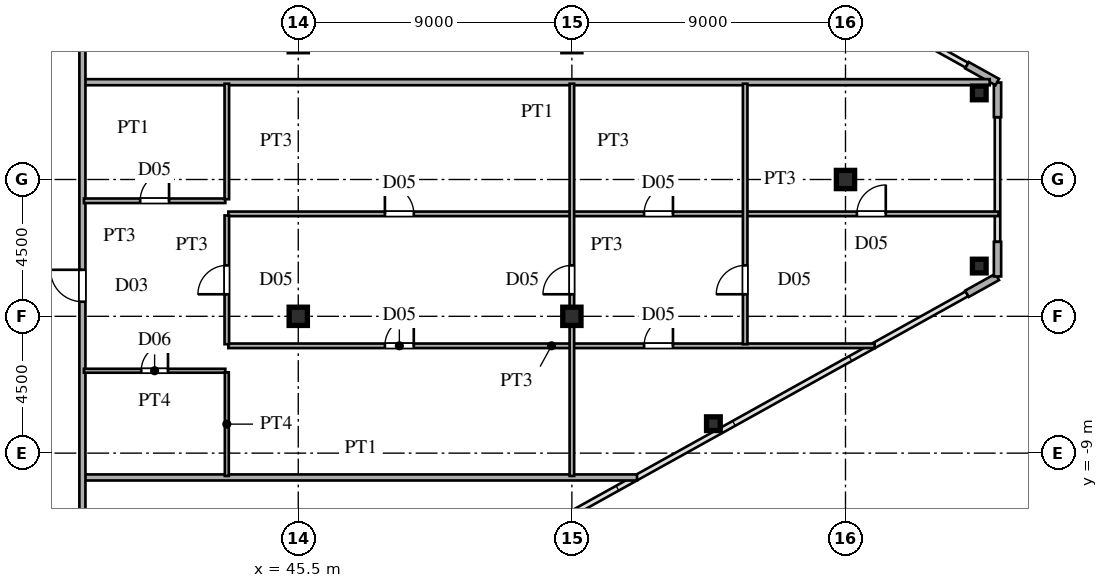
"""IFC4 building model, lengths in metres.
Left out: names, types, materials, properties, quantities, classifications, styles, units other than length and angle.
Written with IfcOpenShell. Run it as: python <this file> out.ifc"""

import sys

from ifc_helpers import new_model, si_unit, direction, frame, frame_2d, origin, origin_2d, place, context, subcontext, project, spatial, rectangle, hollow_rectangle, i_section, extrude, source, transform, mapped, element, fill, save


model = new_model("IFC4")
c1 = context("Model", 3, precision=1e-05, world=origin(), true_north=direction((0.0, 1.0)))
c2 = subcontext(c1, "Body", "Model", "MODEL_VIEW")
j1 = project(units=[si_unit("LENGTHUNIT", "METRE"), si_unit("PLANEANGLEUNIT", "RADIAN")], contexts=[c1])
p1 = place(None, origin())
s1 = spatial("IfcSite", under=j1, at=p1, CompositionType="ELEMENT")
p2 = place(p1, origin())
s2 = spatial("IfcBuilding", under=s1, at=p2, CompositionType="ELEMENT")
p3 = place(p2, frame((0.0, 0.0, 188.7)))
s3 = spatial("IfcBuildingStorey", under=s2, at=p3, CompositionType="ELEMENT", Elevation=188.7)
m1 = source(origin(), c2, "Body", "SweptSolid", [
    extrude(i_section(OverallWidth=0.6, OverallDepth=0.6, WebThickness=0.025, FlangeThickness=0.04, at=origin_2d()), origin(), (0.0, 0.0, 1.0), 3.6),
])
for number, where, z_axis, x_axis in (
    (1, (45.5, -4.5, 0.0), (0.0, 0.0, 1.0), (1.0, 0.0, 0.0)),
    (2, (54.5, -4.5, 0.0), (0.0, 0.0, 1.0), (1.0, 0.0, 0.0)),
    (3, (63.5, 0.0, 0.0), (0.0, 0.0, 1.0), (1.0, 0.0, 0.0)),
):
    element("IfcColumn", number, at=place(p3, frame(where, z_axis=z_axis, x_axis=x_axis)), inside=s3, PredefinedType="COLUMN", context=c2, shape_type="MappedRepresentation", body=[
        mapped(m1, transform((0.0, 0.0, 0.0), scale=1.0)),
    ])
m2 = source(origin(), c2, "Body", "SweptSolid", [
    extrude(hollow_rectangle(XDim=0.45, YDim=0.45, WallThickness=0.018, at=origin_2d()), origin(), (0.0, 0.0, 1.0), 3.6),
])
for number, where, z_axis, x_axis in (
    (4, (67.9, -2.847, 0.0), (0.0, 0.0, 1.0), (1.0, 0.0, 0.0)),
    (5, (67.9, 2.847, 0.0), (0.0, 0.0, 1.0), (1.0, 0.0, 0.0)),
    (6, (59.155, -8.031, 0.0), (0.0, 0.0, 1.0), (1.0, 0.0, 0.0)),
):
    element("IfcColumn", number, at=place(p3, frame(where, z_axis=z_axis, x_axis=x_axis)), inside=s3, PredefinedType="COLUMN", context=c2, shape_type="MappedRepresentation", body=[
        mapped(m2, transform((0.0, 0.0, 0.0), scale=1.0)),
    ])
for number, where, z_axis, x_axis in (
    (7, (67.495, -3.759, 0.0), (0.0, 0.0, 1.0), (0.874, 0.486, 0.0)),
    (8, (68.5, -3.19, 0.0), (0.0, 0.0, 1.0), (0.0, 1.0, 0.0)),
    (9, (68.5, 2.05, 0.0), (0.0, 0.0, 1.0), (0.0, 1.0, 0.0)),
    (10, (68.491, 3.205, 0.0), (0.0, 0.0, 1.0), (-0.874, 0.486, 0.0)),
):
    element("IfcWall", number, at=place(p3, frame(where, z_axis=z_axis, x_axis=x_axis)), inside=s3, PredefinedType="SOLIDWALL", context=c2, shape_type="SweptSolid", body=[
        extrude(rectangle(XDim=1.14, YDim=0.24, at=frame_2d((0.57, 0.0))), origin(), (0.0, 0.0, 1.0), 3.38),
    ])
p4 = place(p3, frame((38.48, -9.8, 0.0), z_axis=(0.0, 0.0, 1.0), x_axis=(1.0, 0.0, 0.0)))
e11 = element("IfcWall", 11, at=p4, inside=s3, PredefinedType="PARTITIONING", context=c2, shape_type="SweptSolid", body=[
    extrude(rectangle(XDim=18.163, YDim=0.2, at=frame_2d((9.082, 0.0))), origin(), (0.0, 0.0, 1.0), 3.38),
])
p5 = place(p3, frame((38.45, -6.29, 0.0), z_axis=(0.0, 0.0, 1.0), x_axis=(1.0, 0.0, 0.0)))
e12 = element("IfcWall", 12, at=p5, inside=s3, PredefinedType="PARTITIONING", context=c2, shape_type="SweptSolid", body=[
    extrude(rectangle(XDim=4.65, YDim=0.13, at=frame_2d((2.325, 0.0))), origin(), (0.0, 0.0, 1.0), 3.38),
])
p6 = place(p5, frame((1.885, 0.0, 0.0)))
e13 = element("IfcOpeningElement", 13, at=p6, cuts=e12, PredefinedType="OPENING", context=c2, shape_type="SweptSolid", body=[
    extrude(rectangle(XDim=0.88, YDim=2.1, at=frame_2d((0.44, 1.05))), frame((0.0, 0.075, 0.0), z_axis=(0.0, -1.0, 0.0), x_axis=(1.0, 0.0, 0.0)), (0.0, 0.0, 1.0), 0.15),
])
p7 = place(p3, frame((43.2, -5.47, 0.0), z_axis=(0.0, 0.0, 1.0), x_axis=(1.0, 0.0, 0.0)))
e14 = element("IfcWall", 14, at=p7, inside=s3, PredefinedType="PARTITIONING", context=c2, shape_type="SweptSolid", body=[
    extrude(rectangle(XDim=21.259, YDim=0.15, at=frame_2d((10.629, 0.0))), origin(), (0.0, 0.0, 1.0), 3.38),
])
p8 = place(p7, frame((5.15, 0.0, 0.0)))
e15 = element("IfcOpeningElement", 15, at=p8, cuts=e14, PredefinedType="OPENING", context=c2, shape_type="SweptSolid", body=[
    extrude(rectangle(XDim=0.95, YDim=2.15, at=frame_2d((0.475, 1.075))), frame((0.0, 0.085, 0.0), z_axis=(0.0, -1.0, 0.0), x_axis=(1.0, 0.0, 0.0)), (0.0, 0.0, 1.0), 0.17),
])
p9 = place(p7, frame((13.675, 0.0, 0.0)))
e16 = element("IfcOpeningElement", 16, at=p9, cuts=e14, PredefinedType="OPENING", context=c2, shape_type="SweptSolid", body=[
    extrude(rectangle(XDim=0.95, YDim=2.15, at=frame_2d((0.475, 1.075))), frame((0.0, 0.085, 0.0), z_axis=(0.0, -1.0, 0.0), x_axis=(1.0, 0.0, 0.0)), (0.0, 0.0, 1.0), 0.17),
])
p10 = place(p3, frame((43.2, -1.13, 0.0), z_axis=(0.0, 0.0, 1.0), x_axis=(1.0, 0.0, 0.0)))
e17 = element("IfcWall", 17, at=p10, inside=s3, PredefinedType="PARTITIONING", context=c2, shape_type="SweptSolid", body=[
    extrude(rectangle(XDim=25.335, YDim=0.15, at=frame_2d((12.667, 0.0))), origin(), (0.0, 0.0, 1.0), 3.38),
])
p11 = place(p10, frame((5.15, 0.0, 0.0)))
e18 = element("IfcOpeningElement", 18, at=p11, cuts=e17, PredefinedType="OPENING", context=c2, shape_type="SweptSolid", body=[
    extrude(rectangle(XDim=0.95, YDim=2.15, at=frame_2d((0.475, 1.075))), frame((0.0, 0.085, 0.0), z_axis=(0.0, -1.0, 0.0), x_axis=(1.0, 0.0, 0.0)), (0.0, 0.0, 1.0), 0.17),
])
p12 = place(p10, frame((20.675, 0.0, 0.0)))
e19 = element("IfcOpeningElement", 19, at=p12, cuts=e17, PredefinedType="OPENING", context=c2, shape_type="SweptSolid", body=[
    extrude(rectangle(XDim=0.95, YDim=2.15, at=frame_2d((0.475, 1.075))), frame((0.0, 0.085, 0.0), z_axis=(0.0, -1.0, 0.0), x_axis=(1.0, 0.0, 0.0)), (0.0, 0.0, 1.0), 0.17),
])
p13 = place(p10, frame((13.675, 0.0, 0.0)))
e20 = element("IfcOpeningElement", 20, at=p13, cuts=e17, PredefinedType="OPENING", context=c2, shape_type="SweptSolid", body=[
    extrude(rectangle(XDim=0.95, YDim=2.15, at=frame_2d((0.475, 1.075))), frame((0.0, 0.085, 0.0), z_axis=(0.0, -1.0, 0.0), x_axis=(1.0, 0.0, 0.0)), (0.0, 0.0, 1.0), 0.17),
])
p14 = place(p3, frame((38.45, -0.7, 0.0), z_axis=(0.0, 0.0, 1.0), x_axis=(1.0, 0.0, 0.0)))
e21 = element("IfcWall", 21, at=p14, inside=s3, PredefinedType="PARTITIONING", context=c2, shape_type="SweptSolid", body=[
    extrude(rectangle(XDim=4.65, YDim=0.15, at=frame_2d((2.325, 0.0))), origin(), (0.0, 0.0, 1.0), 3.38),
])
p15 = place(p14, frame((1.85, 0.0, 0.0)))
e22 = element("IfcOpeningElement", 22, at=p15, cuts=e21, PredefinedType="OPENING", context=c2, shape_type="SweptSolid", body=[
    extrude(rectangle(XDim=0.95, YDim=2.15, at=frame_2d((0.475, 1.075))), frame((0.0, 0.085, 0.0), z_axis=(0.0, -1.0, 0.0), x_axis=(1.0, 0.0, 0.0)), (0.0, 0.0, 1.0), 0.17),
])
p16 = place(p3, frame((38.48, 3.2, 0.0), z_axis=(0.0, 0.0, 1.0), x_axis=(1.0, 0.0, 0.0)))
e23 = element("IfcWall", 23, at=p16, inside=s3, PredefinedType="PARTITIONING", context=c2, shape_type="SweptSolid", body=[
    extrude(rectangle(XDim=29.763, YDim=0.2, at=frame_2d((14.881, 0.0))), origin(), (0.0, 0.0, 1.0), 3.38),
])
p17 = place(p3, frame((38.4, -15.715, 0.0), z_axis=(0.0, 0.0, 1.0), x_axis=(0.0, 1.0, 0.0)))
e24 = element("IfcWall", 24, at=p17, inside=s3, PredefinedType="PARTITIONING", context=c2, shape_type="SweptSolid", body=[
    extrude(rectangle(XDim=31.43, YDim=0.2, at=frame_2d((15.715, 0.0))), origin(), (0.0, 0.0, 1.0), 3.38),
])
p18 = place(p17, frame((2.39, 0.0, 0.0)))
e25 = element("IfcOpeningElement", 25, at=p18, cuts=e24, PredefinedType="OPENING", context=c2, shape_type="SweptSolid", body=[
    extrude(rectangle(XDim=1.05, YDim=2.25, at=frame_2d((0.525, 1.125))), frame((0.0, 0.11, 0.0), z_axis=(0.0, -1.0, 0.0), x_axis=(1.0, 0.0, 0.0)), (0.0, 0.0, 1.0), 0.22),
])
p19 = place(p17, frame((11.695, 0.0, 0.0)))
e26 = element("IfcOpeningElement", 26, at=p19, cuts=e24, PredefinedType="OPENING", context=c2, shape_type="SweptSolid", body=[
    extrude(rectangle(XDim=1.05, YDim=2.25, at=frame_2d((0.525, 1.125))), frame((0.0, 0.11, 0.0), z_axis=(0.0, -1.0, 0.0), x_axis=(1.0, 0.0, 0.0)), (0.0, 0.0, 1.0), 0.22),
])
p20 = place(p17, frame((24.69, 0.0, 0.0)))
e27 = element("IfcOpeningElement", 27, at=p20, cuts=e24, PredefinedType="OPENING", context=c2, shape_type="SweptSolid", body=[
    extrude(rectangle(XDim=1.05, YDim=2.25, at=frame_2d((0.525, 1.125))), frame((0.0, 0.11, 0.0), z_axis=(0.0, -1.0, 0.0), x_axis=(1.0, 0.0, 0.0)), (0.0, 0.0, 1.0), 0.22),
])
p21 = place(p3, frame((43.15, -9.75, 0.0), z_axis=(0.0, 0.0, 1.0), x_axis=(0.0, 1.0, 0.0)))
e28 = element("IfcWall", 28, at=p21, inside=s3, PredefinedType="PARTITIONING", context=c2, shape_type="SweptSolid", body=[
    extrude(rectangle(XDim=3.408, YDim=0.13, at=frame_2d((1.704, 0.0))), origin(), (0.0, 0.0, 1.0), 3.38),
])
p22 = place(p3, frame((43.15, -5.417, 0.0), z_axis=(0.0, 0.0, 1.0), x_axis=(0.0, 1.0, 0.0)))
e29 = element("IfcWall", 29, at=p22, inside=s3, PredefinedType="PARTITIONING", context=c2, shape_type="SweptSolid", body=[
    extrude(rectangle(XDim=4.234, YDim=0.15, at=frame_2d((2.117, 0.0))), origin(), (0.0, 0.0, 1.0), 2.99),
])
p23 = place(p22, frame((1.642, 0.0, 0.0)))
e30 = element("IfcOpeningElement", 30, at=p23, cuts=e29, PredefinedType="OPENING", context=c2, shape_type="SweptSolid", body=[
    extrude(rectangle(XDim=0.95, YDim=2.15, at=frame_2d((0.475, 1.075))), frame((0.0, 0.085, 0.0), z_axis=(0.0, -1.0, 0.0), x_axis=(1.0, 0.0, 0.0)), (0.0, 0.0, 1.0), 0.17),
])
p24 = place(p3, frame((43.15, -0.648, 0.0), z_axis=(0.0, 0.0, 1.0), x_axis=(0.0, 1.0, 0.0)))
e31 = element("IfcWall", 31, at=p24, inside=s3, PredefinedType="PARTITIONING", context=c2, shape_type="SweptSolid", body=[
    extrude(rectangle(XDim=3.798, YDim=0.15, at=frame_2d((1.899, 0.0))), origin(), (0.0, 0.0, 1.0), 3.38),
])
p25 = place(p3, frame((54.5, -9.75, 0.0), z_axis=(0.0, 0.0, 1.0), x_axis=(0.0, 1.0, 0.0)))
e32 = element("IfcWall", 32, at=p25, inside=s3, PredefinedType="PARTITIONING", context=c2, shape_type="SweptSolid", body=[
    extrude(rectangle(XDim=12.9, YDim=0.15, at=frame_2d((6.45, 0.0))), origin(), (0.0, 0.0, 1.0), 2.78),
])
p26 = place(p25, frame((5.975, 0.0, 0.0)))
e33 = element("IfcOpeningElement", 33, at=p26, cuts=e32, PredefinedType="OPENING", context=c2, shape_type="SweptSolid", body=[
    extrude(rectangle(XDim=0.95, YDim=2.15, at=frame_2d((0.475, 1.075))), frame((0.0, 0.085, 0.0), z_axis=(0.0, -1.0, 0.0), x_axis=(1.0, 0.0, 0.0)), (0.0, 0.0, 1.0), 0.17),
])
p27 = place(p3, frame((60.2, -5.417, 0.0), z_axis=(0.0, 0.0, 1.0), x_axis=(0.0, 1.0, 0.0)))
e34 = element("IfcWall", 34, at=p27, inside=s3, PredefinedType="PARTITIONING", context=c2, shape_type="SweptSolid", body=[
    extrude(rectangle(XDim=8.567, YDim=0.15, at=frame_2d((4.283, 0.0))), origin(), (0.0, 0.0, 1.0), 3.38),
])
p28 = place(p27, frame((1.642, 0.0, 0.0)))
e35 = element("IfcOpeningElement", 35, at=p28, cuts=e34, PredefinedType="OPENING", context=c2, shape_type="SweptSolid", body=[
    extrude(rectangle(XDim=0.95, YDim=2.15, at=frame_2d((0.475, 1.075))), frame((0.0, 0.085, 0.0), z_axis=(0.0, -1.0, 0.0), x_axis=(1.0, 0.0, 0.0)), (0.0, 0.0, 1.0), 0.17),
])
m3 = source(origin(), c2, "Body", "SweptSolid", [
    extrude(rectangle(XDim=0.88, YDim=2.1, at=frame_2d((0.44, 1.05))), frame((0.0, 0.025, 0.0), z_axis=(0.0, -1.0, 0.0), x_axis=(1.0, 0.0, 0.0)), (0.0, 0.0, 1.0), 0.05),
])
p29 = place(p6, origin())
e36 = element("IfcDoor", 36, at=p29, inside=s3, OperationType="SINGLE_SWING_RIGHT", PredefinedType="DOOR", context=c2, shape_type="MappedRepresentation", body=[
    mapped(m3, transform((0.0, 0.0, 0.0), scale=1.0)),
])
fill(e13, e36)
m4 = source(origin(), c2, "Body", "SweptSolid", [
    extrude(rectangle(XDim=0.95, YDim=2.15, at=frame_2d((0.475, 1.075))), frame((0.0, 0.025, 0.0), z_axis=(0.0, -1.0, 0.0), x_axis=(1.0, 0.0, 0.0)), (0.0, 0.0, 1.0), 0.05),
])
p30 = place(p8, origin())
e37 = element("IfcDoor", 37, at=p30, inside=s3, OperationType="SINGLE_SWING_RIGHT", PredefinedType="DOOR", context=c2, shape_type="MappedRepresentation", body=[
    mapped(m4, transform((0.0, 0.0, 0.0), scale=1.0)),
])
fill(e15, e37)
p31 = place(p9, origin())
e38 = element("IfcDoor", 38, at=p31, inside=s3, OperationType="SINGLE_SWING_RIGHT", PredefinedType="DOOR", context=c2, shape_type="MappedRepresentation", body=[
    mapped(m4, transform((0.0, 0.0, 0.0), scale=1.0)),
])
fill(e16, e38)
p32 = place(p11, origin())
e39 = element("IfcDoor", 39, at=p32, inside=s3, OperationType="SINGLE_SWING_LEFT", PredefinedType="DOOR", context=c2, shape_type="MappedRepresentation", body=[
    mapped(m4, transform((0.0, 0.0, 0.0), scale=1.0)),
])
fill(e18, e39)
p33 = place(p12, origin())
e40 = element("IfcDoor", 40, at=p33, inside=s3, OperationType="SINGLE_SWING_RIGHT", PredefinedType="DOOR", context=c2, shape_type="MappedRepresentation", body=[
    mapped(m4, transform((0.0, 0.0, 0.0), scale=1.0)),
])
fill(e19, e40)
p34 = place(p13, origin())
e41 = element("IfcDoor", 41, at=p34, inside=s3, OperationType="SINGLE_SWING_RIGHT", PredefinedType="DOOR", context=c2, shape_type="MappedRepresentation", body=[
    mapped(m4, transform((0.0, 0.0, 0.0), scale=1.0)),
])
fill(e20, e41)
p35 = place(p15, origin())
e42 = element("IfcDoor", 42, at=p35, inside=s3, OperationType="SINGLE_SWING_RIGHT", PredefinedType="DOOR", context=c2, shape_type="MappedRepresentation", body=[
    mapped(m4, transform((0.0, 0.0, 0.0), scale=1.0)),
])
fill(e22, e42)
m5 = source(origin(), c2, "Body", "SweptSolid", [
    extrude(rectangle(XDim=1.05, YDim=2.25, at=frame_2d((0.525, 1.125))), frame((0.0, 0.025, 0.0), z_axis=(0.0, -1.0, 0.0), x_axis=(1.0, 0.0, 0.0)), (0.0, 0.0, 1.0), 0.05),
])
p36 = place(p19, origin())
e43 = element("IfcDoor", 43, at=p36, inside=s3, OperationType="SINGLE_SWING_RIGHT", PredefinedType="DOOR", context=c2, shape_type="MappedRepresentation", body=[
    mapped(m5, transform((0.0, 0.0, 0.0), scale=1.0)),
])
fill(e26, e43)
p37 = place(p23, origin())
e44 = element("IfcDoor", 44, at=p37, inside=s3, OperationType="SINGLE_SWING_LEFT", PredefinedType="DOOR", context=c2, shape_type="MappedRepresentation", body=[
    mapped(m4, transform((0.0, 0.0, 0.0), scale=1.0)),
])
fill(e30, e44)
p38 = place(p26, origin())
e45 = element("IfcDoor", 45, at=p38, inside=s3, OperationType="SINGLE_SWING_LEFT", PredefinedType="DOOR", context=c2, shape_type="MappedRepresentation", body=[
    mapped(m4, transform((0.0, 0.0, 0.0), scale=1.0)),
])
fill(e33, e45)
p39 = place(p28, origin())
e46 = element("IfcDoor", 46, at=p39, inside=s3, OperationType="SINGLE_SWING_LEFT", PredefinedType="DOOR", context=c2, shape_type="MappedRepresentation", body=[
    mapped(m4, transform((0.0, 0.0, 0.0), scale=1.0)),
])
fill(e35, e46)
save(model, sys.argv[1])
